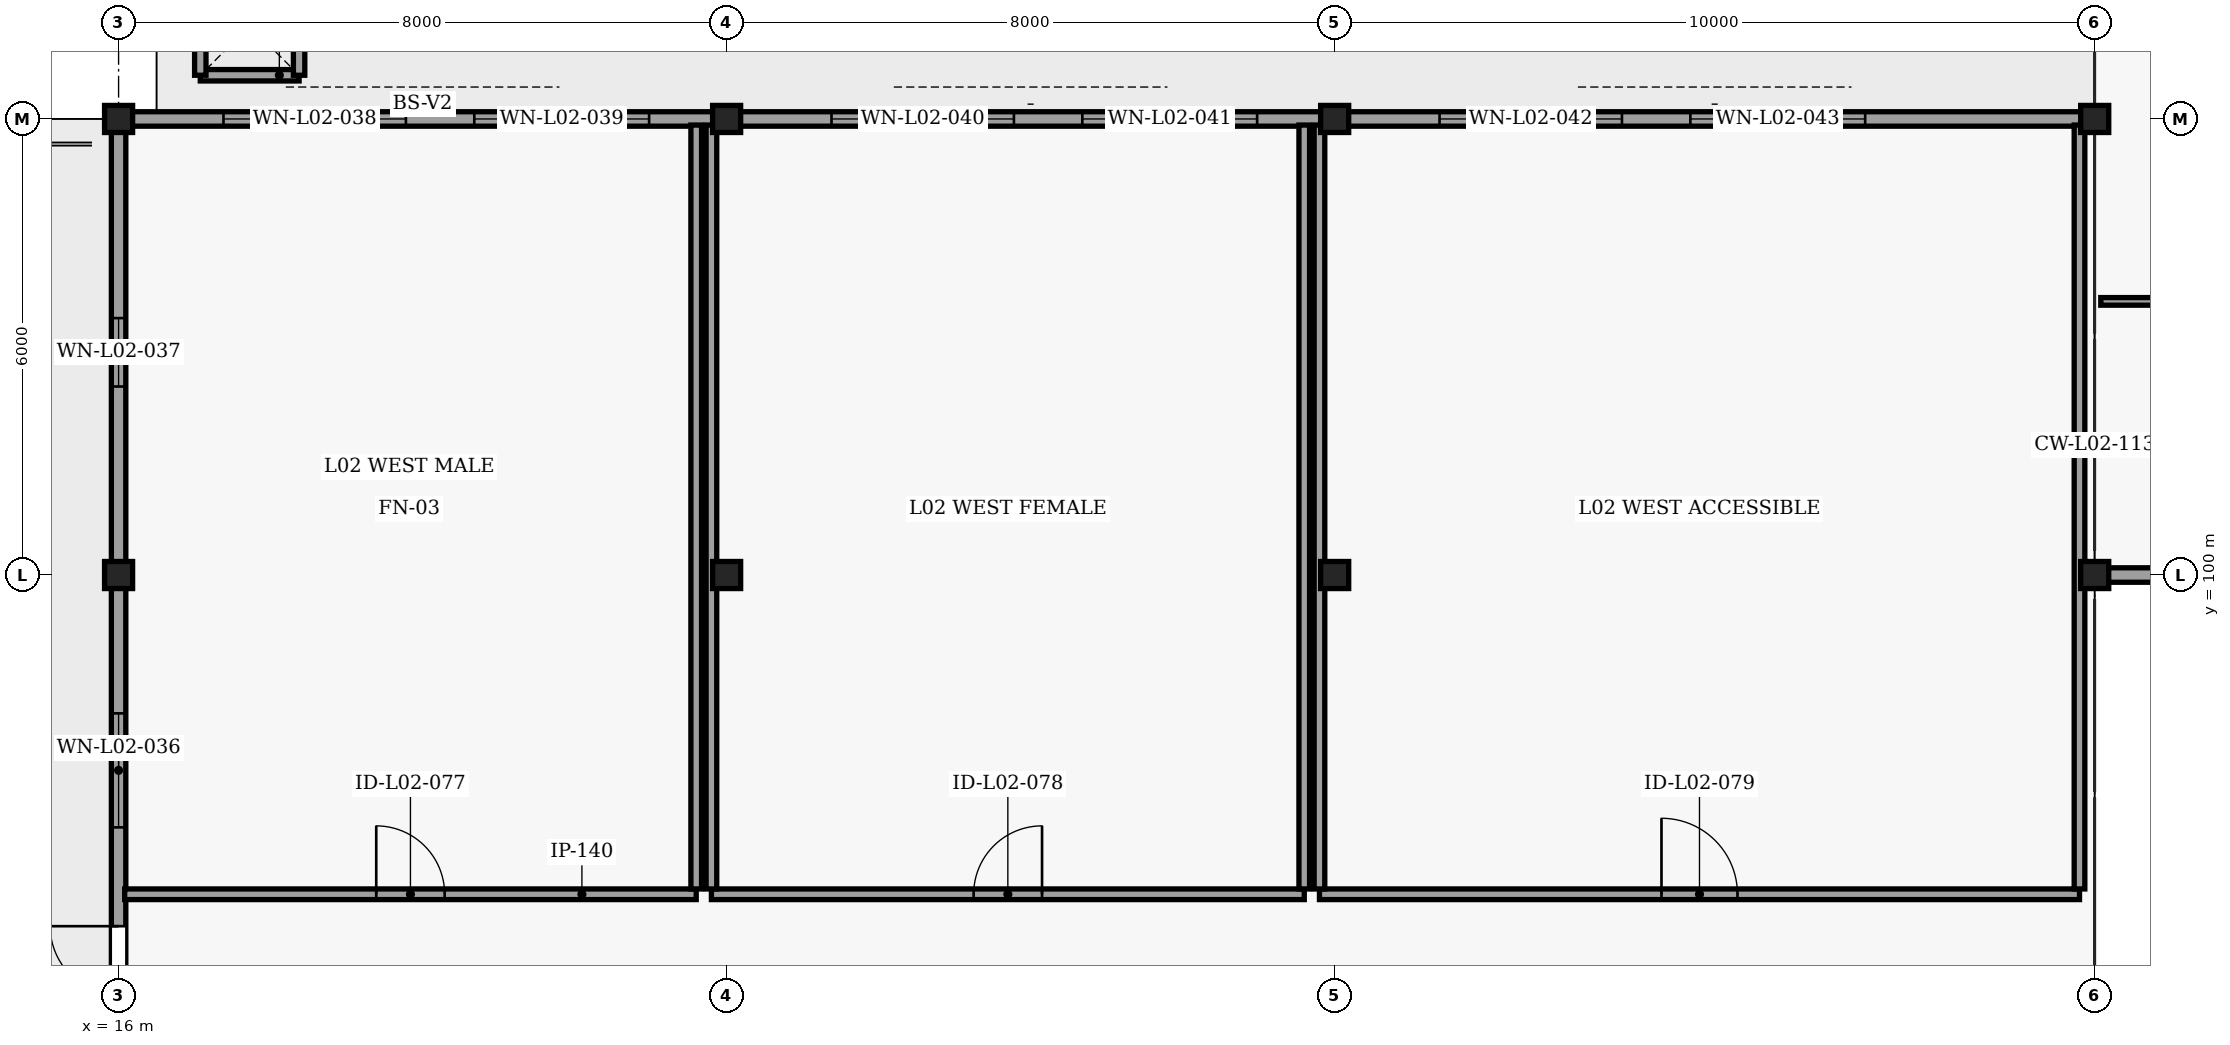
"""IFC4 building model, lengths in metres.
Left out: names, types, materials, properties, quantities, classifications, styles, units other than length and angle.
Written with IfcOpenShell. Run it as: python <this file> out.ifc"""

import sys

from ifc_helpers import new_model, si_unit, direction, frame, frame_2d, origin, origin_2d, place, context, subcontext, project, spatial, rectangle, i_section, extrude, element, fill, save


model = new_model("IFC4")
c1 = context("Model", 3, precision=1e-05, world=origin(), true_north=direction((0.0, 1.0)))
c2 = subcontext(c1, "Body", "Model", "MODEL_VIEW")
j1 = project(units=[si_unit("LENGTHUNIT", "METRE"), si_unit("PLANEANGLEUNIT", "RADIAN")], contexts=[c1])
p1 = place(None, origin())
s1 = spatial("IfcSite", under=j1, at=p1, CompositionType="ELEMENT")
p2 = place(p1, origin())
s2 = spatial("IfcBuilding", under=s1, at=p2, CompositionType="ELEMENT")
p3 = place(p2, frame((0.0, 0.0, 5.4)))
s3 = spatial("IfcBuildingStorey", under=s2, at=p3, CompositionType="ELEMENT", Elevation=5.4)
for number, where, z_axis, x_axis in (
    (1, (16.0, 100.0, 0.0), (0.0, 0.0, 1.0), (1.0, 0.0, 0.0)),
    (2, (24.0, 100.0, 0.0), (0.0, 0.0, 1.0), (1.0, 0.0, 0.0)),
    (3, (32.0, 100.0, 0.0), (0.0, 0.0, 1.0), (1.0, 0.0, 0.0)),
    (4, (42.0, 100.0, 0.0), (0.0, 0.0, 1.0), (1.0, 0.0, 0.0)),
    (5, (16.0, 106.0, 0.0), (0.0, 0.0, 1.0), (1.0, 0.0, 0.0)),
    (6, (24.0, 106.0, 0.0), (0.0, 0.0, 1.0), (1.0, 0.0, 0.0)),
    (7, (32.0, 106.0, 0.0), (0.0, 0.0, 1.0), (1.0, 0.0, 0.0)),
    (8, (42.0, 106.0, 0.0), (0.0, 0.0, 1.0), (1.0, 0.0, 0.0)),
):
    element("IfcColumn", number, at=place(p3, frame(where, z_axis=z_axis, x_axis=x_axis)), inside=s3, PredefinedType="COLUMN", context=c2, shape_type="SweptSolid", body=[
        extrude(i_section(OverallWidth=0.369, OverallDepth=0.356, WebThickness=0.011, FlangeThickness=0.018, FilletRadius=0.015, at=origin_2d()), origin(), (0.0, 0.0, 1.0), 4.56),
    ])
for number, where, z_axis, x_axis in (
    (9, (17.075, 106.575, -0.1), (0.0, 0.0, 1.0), (1.0, 0.0, 0.0)),
    (10, (17.075, 106.575, -0.1), (0.0, 0.0, 1.0), (0.0, 1.0, 0.0)),
    (11, (18.375, 106.575, -0.1), (0.0, 0.0, 1.0), (0.0, 1.0, 0.0)),
):
    element("IfcWall", number, at=place(p3, frame(where, z_axis=z_axis, x_axis=x_axis)), inside=s3, PredefinedType="PLUMBINGWALL", context=c2, shape_type="SweptSolid", body=[
        extrude(rectangle(XDim=1.3, YDim=0.15, at=frame_2d((0.65, 0.0))), origin(), (0.0, 0.0, 1.0), 1.2),
    ])
p4 = place(p3, frame((16.0, 89.163, 0.0), z_axis=(0.0, 0.0, 1.0), x_axis=(0.0, 1.0, 0.0)))
e12 = element("IfcWall", 12, at=p4, inside=s3, PredefinedType="SOLIDWALL", context=c2, shape_type="SweptSolid", body=[
    extrude(rectangle(XDim=11.012, YDim=0.19, at=frame_2d((5.506, 0.0))), origin(), (0.0, 0.0, 1.0), 4.141),
])
p5 = place(p4, frame((4.417, 0.0, 0.0)))
e13 = element("IfcOpeningElement", 13, at=p5, cuts=e12, PredefinedType="OPENING", context=c2, shape_type="SweptSolid", body=[
    extrude(rectangle(XDim=1.8, YDim=2.25, at=frame_2d((0.9, 1.125))), frame((0.0, 0.105, 0.0), z_axis=(0.0, -1.0, 0.0), x_axis=(1.0, 0.0, 0.0)), (0.0, 0.0, 1.0), 0.21),
])
p6 = place(p4, frame((1.317, 0.0, 0.95)))
e14 = element("IfcOpeningElement", 14, at=p6, cuts=e12, PredefinedType="OPENING", context=c2, shape_type="SweptSolid", body=[
    extrude(rectangle(XDim=1.95, YDim=1.55, at=frame_2d((0.975, 0.775))), frame((0.0, 0.105, 0.0), z_axis=(0.0, -1.0, 0.0), x_axis=(1.0, 0.0, 0.0)), (0.0, 0.0, 1.0), 0.21),
])
p7 = place(p4, frame((7.517, 0.0, 0.95)))
e15 = element("IfcOpeningElement", 15, at=p7, cuts=e12, PredefinedType="OPENING", context=c2, shape_type="SweptSolid", body=[
    extrude(rectangle(XDim=1.5, YDim=1.5, at=frame_2d((0.75, 0.75))), frame((0.0, 0.105, 0.0), z_axis=(0.0, -1.0, 0.0), x_axis=(1.0, 0.0, 0.0)), (0.0, 0.0, 1.0), 0.21),
])
p8 = place(p3, frame((16.0, 100.163, 0.0), z_axis=(0.0, 0.0, 1.0), x_axis=(0.0, 1.0, 0.0)))
e16 = element("IfcWall", 16, at=p8, inside=s3, PredefinedType="SOLIDWALL", context=c2, shape_type="SweptSolid", body=[
    extrude(rectangle(XDim=5.674, YDim=0.19, at=frame_2d((2.837, 0.0))), origin(), (0.0, 0.0, 1.0), 4.141),
])
p9 = place(p8, frame((2.317, 0.0, 1.35)))
e17 = element("IfcOpeningElement", 17, at=p9, cuts=e16, PredefinedType="OPENING", context=c2, shape_type="SweptSolid", body=[
    extrude(rectangle(XDim=0.9, YDim=0.9, at=frame_2d((0.45, 0.45))), frame((0.0, 0.105, 0.0), z_axis=(0.0, -1.0, 0.0), x_axis=(1.0, 0.0, 0.0)), (0.0, 0.0, 1.0), 0.21),
])
p10 = place(p3, frame((42.169, 100.0, 0.0), z_axis=(0.0, 0.0, 1.0), x_axis=(1.0, 0.0, 0.0)))
e18 = element("IfcWall", 18, at=p10, inside=s3, PredefinedType="SOLIDWALL", context=c2, shape_type="SweptSolid", body=[
    extrude(rectangle(XDim=7.661, YDim=0.19, at=frame_2d((3.831, 0.0))), origin(), (0.0, 0.0, 1.0), 1.041),
])
p11 = place(p3, frame((16.169, 106.0, 0.0), z_axis=(0.0, 0.0, 1.0), x_axis=(1.0, 0.0, 0.0)))
e19 = element("IfcWall", 19, at=p11, inside=s3, PredefinedType="SOLIDWALL", context=c2, shape_type="SweptSolid", body=[
    extrude(rectangle(XDim=8.012, YDim=0.19, at=frame_2d((4.006, 0.0))), origin(), (0.0, 0.0, 1.0), 4.098),
])
p12 = place(p11, frame((1.21, 0.0, 0.95)))
e20 = element("IfcOpeningElement", 20, at=p12, cuts=e19, PredefinedType="OPENING", context=c2, shape_type="SweptSolid", body=[
    extrude(rectangle(XDim=2.4, YDim=1.6, at=frame_2d((1.2, 0.8))), frame((0.0, 0.105, 0.0), z_axis=(0.0, -1.0, 0.0), x_axis=(1.0, 0.0, 0.0)), (0.0, 0.0, 1.0), 0.21),
])
p13 = place(p11, frame((4.51, 0.0, 0.95)))
e21 = element("IfcOpeningElement", 21, at=p13, cuts=e19, PredefinedType="OPENING", context=c2, shape_type="SweptSolid", body=[
    extrude(rectangle(XDim=2.3, YDim=1.58, at=frame_2d((1.15, 0.79))), frame((0.0, 0.105, 0.0), z_axis=(0.0, -1.0, 0.0), x_axis=(1.0, 0.0, 0.0)), (0.0, 0.0, 1.0), 0.21),
])
p14 = place(p3, frame((24.169, 106.0, 0.0), z_axis=(0.0, 0.0, 1.0), x_axis=(1.0, 0.0, 0.0)))
e22 = element("IfcWall", 22, at=p14, inside=s3, PredefinedType="SOLIDWALL", context=c2, shape_type="SweptSolid", body=[
    extrude(rectangle(XDim=8.012, YDim=0.19, at=frame_2d((4.006, 0.0))), origin(), (0.0, 0.0, 1.0), 4.098),
])
p15 = place(p14, frame((1.21, 0.0, 0.95)))
e23 = element("IfcOpeningElement", 23, at=p15, cuts=e22, PredefinedType="OPENING", context=c2, shape_type="SweptSolid", body=[
    extrude(rectangle(XDim=2.4, YDim=1.6, at=frame_2d((1.2, 0.8))), frame((0.0, 0.105, 0.0), z_axis=(0.0, -1.0, 0.0), x_axis=(1.0, 0.0, 0.0)), (0.0, 0.0, 1.0), 0.21),
])
p16 = place(p14, frame((4.51, 0.0, 0.95)))
e24 = element("IfcOpeningElement", 24, at=p16, cuts=e22, PredefinedType="OPENING", context=c2, shape_type="SweptSolid", body=[
    extrude(rectangle(XDim=2.3, YDim=1.58, at=frame_2d((1.15, 0.79))), frame((0.0, 0.105, 0.0), z_axis=(0.0, -1.0, 0.0), x_axis=(1.0, 0.0, 0.0)), (0.0, 0.0, 1.0), 0.21),
])
p17 = place(p3, frame((32.169, 106.0, 0.0), z_axis=(0.0, 0.0, 1.0), x_axis=(1.0, 0.0, 0.0)))
e25 = element("IfcWall", 25, at=p17, inside=s3, PredefinedType="SOLIDWALL", context=c2, shape_type="SweptSolid", body=[
    extrude(rectangle(XDim=9.831, YDim=0.19, at=frame_2d((4.915, 0.0))), origin(), (0.0, 0.0, 1.0), 4.098),
])
p18 = place(p17, frame((1.21, 0.0, 0.95)))
e26 = element("IfcOpeningElement", 26, at=p18, cuts=e25, PredefinedType="OPENING", context=c2, shape_type="SweptSolid", body=[
    extrude(rectangle(XDim=2.4, YDim=1.6, at=frame_2d((1.2, 0.8))), frame((0.0, 0.105, 0.0), z_axis=(0.0, -1.0, 0.0), x_axis=(1.0, 0.0, 0.0)), (0.0, 0.0, 1.0), 0.21),
])
p19 = place(p17, frame((4.51, 0.0, 0.95)))
e27 = element("IfcOpeningElement", 27, at=p19, cuts=e25, PredefinedType="OPENING", context=c2, shape_type="SweptSolid", body=[
    extrude(rectangle(XDim=2.3, YDim=1.58, at=frame_2d((1.15, 0.79))), frame((0.0, 0.105, 0.0), z_axis=(0.0, -1.0, 0.0), x_axis=(1.0, 0.0, 0.0)), (0.0, 0.0, 1.0), 0.21),
])
p20 = place(p3, frame((16.08, 95.8, 0.0), z_axis=(0.0, 0.0, 1.0), x_axis=(1.0, 0.0, 0.0)))
e28 = element("IfcWall", 28, at=p20, inside=s3, PredefinedType="PARTITIONING", context=c2, shape_type="SweptSolid", body=[
    extrude(rectangle(XDim=7.52, YDim=0.14, at=frame_2d((3.76, 0.0))), origin(), (0.0, 0.0, 1.0), 4.5),
])
p21 = place(p20, frame((3.31, 0.0, 0.0)))
e29 = element("IfcOpeningElement", 29, at=p21, cuts=e28, PredefinedType="OPENING", context=c2, shape_type="SweptSolid", body=[
    extrude(rectangle(XDim=0.9, YDim=2.1, at=frame_2d((0.45, 1.05))), frame((0.0, 0.08, 0.0), z_axis=(0.0, -1.0, 0.0), x_axis=(1.0, 0.0, 0.0)), (0.0, 0.0, 1.0), 0.16),
])
p22 = place(p3, frame((23.6, 95.87, 0.0), z_axis=(0.0, 0.0, 1.0), x_axis=(0.0, 1.0, 0.0)))
e30 = element("IfcWall", 30, at=p22, inside=s3, PredefinedType="PARTITIONING", context=c2, shape_type="SweptSolid", body=[
    extrude(rectangle(XDim=10.05, YDim=0.14, at=frame_2d((5.025, 0.0))), origin(), (0.0, 0.0, 1.0), 4.1),
])
p23 = place(p3, frame((23.8, 95.8, 0.0), z_axis=(0.0, 0.0, 1.0), x_axis=(1.0, 0.0, 0.0)))
e31 = element("IfcWall", 31, at=p23, inside=s3, PredefinedType="PARTITIONING", context=c2, shape_type="SweptSolid", body=[
    extrude(rectangle(XDim=7.8, YDim=0.14, at=frame_2d((3.9, 0.0))), origin(), (0.0, 0.0, 1.0), 4.143),
])
p24 = place(p23, frame((3.45, 0.0, 0.0)))
e32 = element("IfcOpeningElement", 32, at=p24, cuts=e31, PredefinedType="OPENING", context=c2, shape_type="SweptSolid", body=[
    extrude(rectangle(XDim=0.9, YDim=2.1, at=frame_2d((0.45, 1.05))), frame((0.0, 0.08, 0.0), z_axis=(0.0, -1.0, 0.0), x_axis=(1.0, 0.0, 0.0)), (0.0, 0.0, 1.0), 0.16),
])
for number, where, z_axis, x_axis in (
    (33, (23.8, 95.87, 0.0), (0.0, 0.0, 1.0), (0.0, 1.0, 0.0)),
    (34, (31.6, 95.87, 0.0), (0.0, 0.0, 1.0), (0.0, 1.0, 0.0)),
):
    element("IfcWall", number, at=place(p3, frame(where, z_axis=z_axis, x_axis=x_axis)), inside=s3, PredefinedType="PARTITIONING", context=c2, shape_type="SweptSolid", body=[
        extrude(rectangle(XDim=10.05, YDim=0.14, at=frame_2d((5.025, 0.0))), origin(), (0.0, 0.0, 1.0), 4.1),
    ])
p25 = place(p3, frame((31.8, 95.8, 0.0), z_axis=(0.0, 0.0, 1.0), x_axis=(1.0, 0.0, 0.0)))
e35 = element("IfcWall", 35, at=p25, inside=s3, PredefinedType="PARTITIONING", context=c2, shape_type="SweptSolid", body=[
    extrude(rectangle(XDim=10.0, YDim=0.14, at=frame_2d((5.0, 0.0))), origin(), (0.0, 0.0, 1.0), 4.143),
])
p26 = place(p25, frame((4.5, 0.0, 0.0)))
e36 = element("IfcOpeningElement", 36, at=p26, cuts=e35, PredefinedType="OPENING", context=c2, shape_type="SweptSolid", body=[
    extrude(rectangle(XDim=1.0, YDim=2.15, at=frame_2d((0.5, 1.075))), frame((0.0, 0.08, 0.0), z_axis=(0.0, -1.0, 0.0), x_axis=(1.0, 0.0, 0.0)), (0.0, 0.0, 1.0), 0.16),
])
p27 = place(p3, frame((31.8, 95.87, 0.0), z_axis=(0.0, 0.0, 1.0), x_axis=(0.0, 1.0, 0.0)))
e37 = element("IfcWall", 37, at=p27, inside=s3, PredefinedType="PARTITIONING", context=c2, shape_type="SweptSolid", body=[
    extrude(rectangle(XDim=10.05, YDim=0.14, at=frame_2d((5.025, 0.0))), origin(), (0.0, 0.0, 1.0), 4.1),
])
p28 = place(p3, frame((41.8, 95.87, 0.0), z_axis=(0.0, 0.0, 1.0), x_axis=(0.0, 1.0, 0.0)))
e38 = element("IfcWall", 38, at=p28, inside=s3, PredefinedType="PARTITIONING", context=c2, shape_type="SweptSolid", body=[
    extrude(rectangle(XDim=10.05, YDim=0.14, at=frame_2d((5.025, 0.0))), origin(), (0.0, 0.0, 1.0), 4.033),
])
p29 = place(p3, frame((42.08, 103.6, 0.0), z_axis=(0.0, 0.0, 1.0), x_axis=(1.0, 0.0, 0.0)))
e39 = element("IfcWall", 39, at=p29, inside=s3, PredefinedType="MOVABLE", context=c2, shape_type="SweptSolid", body=[
    extrude(rectangle(XDim=8.12, YDim=0.1, at=frame_2d((4.06, 0.0))), origin(), (0.0, 0.0, 1.0), 4.033),
])
p30 = place(p29, frame((3.11, 0.0, 0.0)))
e40 = element("IfcOpeningElement", 40, at=p30, cuts=e39, PredefinedType="OPENING", context=c2, shape_type="SweptSolid", body=[
    extrude(rectangle(XDim=1.9, YDim=2.35, at=frame_2d((0.95, 1.175))), frame((0.0, 0.06, 0.0), z_axis=(0.0, -1.0, 0.0), x_axis=(1.0, 0.0, 0.0)), (0.0, 0.0, 1.0), 0.12),
])
p31 = place(p5, origin())
e41 = element("IfcDoor", 41, at=p31, inside=s3, OperationType="DOUBLE_DOOR_SINGLE_SWING", PredefinedType="DOOR", context=c2, shape_type="SweptSolid", body=[
    extrude(rectangle(XDim=1.8, YDim=2.25, at=frame_2d((0.9, 1.125))), frame((0.0, 0.025, 0.0), z_axis=(0.0, -1.0, 0.0), x_axis=(1.0, 0.0, 0.0)), (0.0, 0.0, 1.0), 0.05),
])
fill(e13, e41)
p32 = place(p7, origin())
e42 = element("IfcWindow", 42, at=p32, inside=s3, PartitioningType="SINGLE_PANEL", PredefinedType="WINDOW", context=c2, shape_type="SweptSolid", body=[
    extrude(rectangle(XDim=1.5, YDim=1.5, at=frame_2d((0.75, 0.75))), frame((0.0, 0.03, 0.0), z_axis=(0.0, -1.0, 0.0), x_axis=(1.0, 0.0, 0.0)), (0.0, 0.0, 1.0), 0.06),
])
fill(e15, e42)
p33 = place(p9, origin())
e43 = element("IfcWindow", 43, at=p33, inside=s3, PartitioningType="SINGLE_PANEL", PredefinedType="WINDOW", context=c2, shape_type="SweptSolid", body=[
    extrude(rectangle(XDim=0.9, YDim=0.9, at=frame_2d((0.45, 0.45))), frame((0.0, 0.03, 0.0), z_axis=(0.0, -1.0, 0.0), x_axis=(1.0, 0.0, 0.0)), (0.0, 0.0, 1.0), 0.06),
])
fill(e17, e43)
p34 = place(p12, origin())
e44 = element("IfcWindow", 44, at=p34, inside=s3, PartitioningType="SINGLE_PANEL", PredefinedType="WINDOW", context=c2, shape_type="SweptSolid", body=[
    extrude(rectangle(XDim=2.4, YDim=1.6, at=frame_2d((1.2, 0.8))), frame((0.0, 0.03, 0.0), z_axis=(0.0, -1.0, 0.0), x_axis=(1.0, 0.0, 0.0)), (0.0, 0.0, 1.0), 0.06),
])
fill(e20, e44)
p35 = place(p13, origin())
e45 = element("IfcWindow", 45, at=p35, inside=s3, PartitioningType="SINGLE_PANEL", PredefinedType="WINDOW", context=c2, shape_type="SweptSolid", body=[
    extrude(rectangle(XDim=2.3, YDim=1.58, at=frame_2d((1.15, 0.79))), frame((0.0, 0.03, 0.0), z_axis=(0.0, -1.0, 0.0), x_axis=(1.0, 0.0, 0.0)), (0.0, 0.0, 1.0), 0.06),
])
fill(e21, e45)
p36 = place(p15, origin())
e46 = element("IfcWindow", 46, at=p36, inside=s3, PartitioningType="SINGLE_PANEL", PredefinedType="WINDOW", context=c2, shape_type="SweptSolid", body=[
    extrude(rectangle(XDim=2.4, YDim=1.6, at=frame_2d((1.2, 0.8))), frame((0.0, 0.03, 0.0), z_axis=(0.0, -1.0, 0.0), x_axis=(1.0, 0.0, 0.0)), (0.0, 0.0, 1.0), 0.06),
])
fill(e23, e46)
p37 = place(p16, origin())
e47 = element("IfcWindow", 47, at=p37, inside=s3, PartitioningType="SINGLE_PANEL", PredefinedType="WINDOW", context=c2, shape_type="SweptSolid", body=[
    extrude(rectangle(XDim=2.3, YDim=1.58, at=frame_2d((1.15, 0.79))), frame((0.0, 0.03, 0.0), z_axis=(0.0, -1.0, 0.0), x_axis=(1.0, 0.0, 0.0)), (0.0, 0.0, 1.0), 0.06),
])
fill(e24, e47)
p38 = place(p18, origin())
e48 = element("IfcWindow", 48, at=p38, inside=s3, PartitioningType="SINGLE_PANEL", PredefinedType="WINDOW", context=c2, shape_type="SweptSolid", body=[
    extrude(rectangle(XDim=2.4, YDim=1.6, at=frame_2d((1.2, 0.8))), frame((0.0, 0.03, 0.0), z_axis=(0.0, -1.0, 0.0), x_axis=(1.0, 0.0, 0.0)), (0.0, 0.0, 1.0), 0.06),
])
fill(e26, e48)
p39 = place(p19, origin())
e49 = element("IfcWindow", 49, at=p39, inside=s3, PartitioningType="SINGLE_PANEL", PredefinedType="WINDOW", context=c2, shape_type="SweptSolid", body=[
    extrude(rectangle(XDim=2.3, YDim=1.58, at=frame_2d((1.15, 0.79))), frame((0.0, 0.03, 0.0), z_axis=(0.0, -1.0, 0.0), x_axis=(1.0, 0.0, 0.0)), (0.0, 0.0, 1.0), 0.06),
])
fill(e27, e49)
p40 = place(p21, origin())
e50 = element("IfcDoor", 50, at=p40, inside=s3, OperationType="SINGLE_SWING_LEFT", PredefinedType="DOOR", context=c2, shape_type="SweptSolid", body=[
    extrude(rectangle(XDim=0.9, YDim=2.1, at=frame_2d((0.45, 1.05))), frame((0.0, 0.025, 0.0), z_axis=(0.0, -1.0, 0.0), x_axis=(1.0, 0.0, 0.0)), (0.0, 0.0, 1.0), 0.05),
])
fill(e29, e50)
p41 = place(p24, origin())
e51 = element("IfcDoor", 51, at=p41, inside=s3, OperationType="SINGLE_SWING_RIGHT", PredefinedType="DOOR", context=c2, shape_type="SweptSolid", body=[
    extrude(rectangle(XDim=0.9, YDim=2.1, at=frame_2d((0.45, 1.05))), frame((0.0, 0.025, 0.0), z_axis=(0.0, -1.0, 0.0), x_axis=(1.0, 0.0, 0.0)), (0.0, 0.0, 1.0), 0.05),
])
fill(e32, e51)
p42 = place(p26, origin())
e52 = element("IfcDoor", 52, at=p42, inside=s3, OperationType="SINGLE_SWING_LEFT", PredefinedType="DOOR", context=c2, shape_type="SweptSolid", body=[
    extrude(rectangle(XDim=1.0, YDim=2.15, at=frame_2d((0.5, 1.075))), frame((0.0, 0.025, 0.0), z_axis=(0.0, -1.0, 0.0), x_axis=(1.0, 0.0, 0.0)), (0.0, 0.0, 1.0), 0.05),
])
fill(e36, e52)
save(model, sys.argv[1])
